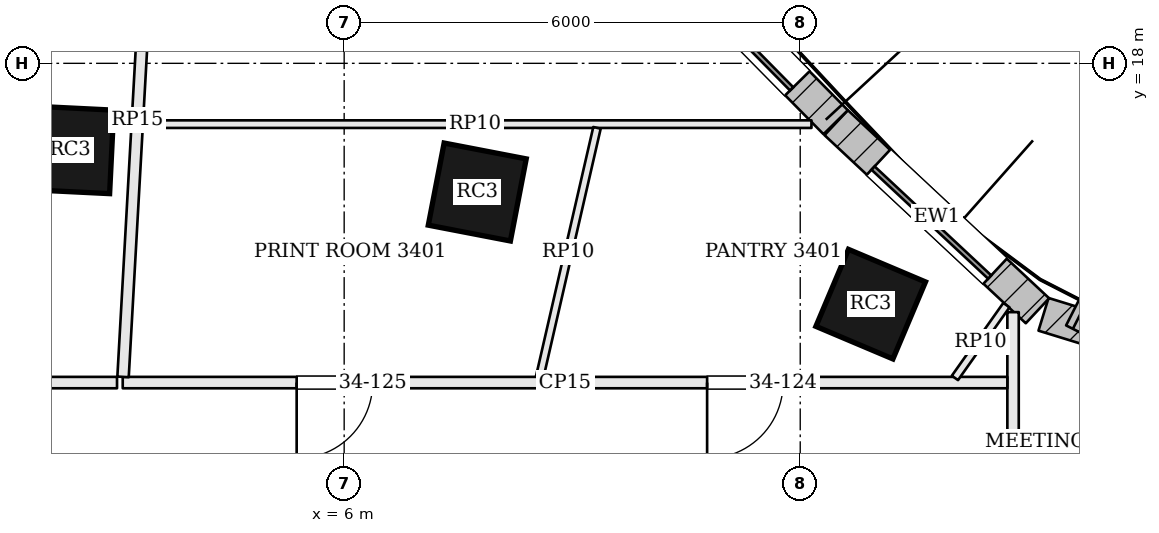
"""IFC4 building model, lengths in metres.
Left out: names, types, materials, properties, quantities, classifications, styles, units other than length and angle.
Written with IfcOpenShell. Run it as: python <this file> out.ifc"""

import sys

from ifc_helpers import new_model, si_unit, direction, frame, frame_2d, origin, origin_2d, place, context, subcontext, project, spatial, rectangle, extrude, element, fill, save


model = new_model("IFC4")
c1 = context("Model", 3, precision=1e-05, world=origin(), true_north=direction((0.0, 1.0)))
c2 = subcontext(c1, "Body", "Model", "MODEL_VIEW")
j1 = project(units=[si_unit("LENGTHUNIT", "METRE"), si_unit("PLANEANGLEUNIT", "RADIAN")], contexts=[c1])
p1 = place(None, origin())
s1 = spatial("IfcSite", under=j1, at=p1, CompositionType="ELEMENT")
p2 = place(p1, origin())
s2 = spatial("IfcBuilding", under=s1, at=p2, CompositionType="ELEMENT")
p3 = place(p2, frame((0.0, 0.0, 142.2)))
s3 = spatial("IfcBuildingStorey", under=s2, at=p3, CompositionType="ELEMENT", Elevation=142.2)
for number, where, z_axis, x_axis in (
    (1, (12.927, 14.832, 0.0), (0.0, 0.0, 1.0), (-0.921, 0.389, 0.0)),
    (2, (7.751, 16.307, 0.0), (0.0, 0.0, 1.0), (-0.982, 0.189, 0.0)),
    (3, (2.392, 16.862, 0.0), (0.0, 0.0, 1.0), (-0.999, 0.049, 0.0)),
):
    element("IfcColumn", number, at=place(p3, frame(where, z_axis=z_axis, x_axis=x_axis)), inside=s3, PredefinedType="COLUMN", context=c2, shape_type="SweptSolid", body=[
        extrude(rectangle(XDim=1.1, YDim=1.1, at=origin_2d()), origin(), (0.0, 0.0, 1.0), 3.9),
    ])
p4 = place(p3, frame((18.958, 13.542, 0.0), z_axis=(0.0, 0.0, 1.0), x_axis=(-0.955792437529, 0.294042201668, 0.0)))
e4 = element("IfcWall", 4, at=p4, inside=s3, PredefinedType="SOLIDWALL", context=c2, shape_type="SweptSolid", body=[
    extrude(rectangle(XDim=3.931, YDim=0.45, at=frame_2d((1.965, 0.0))), origin(), (0.0, 0.0, 1.0), 3.7),
])
p5 = place(p4, frame((0.915, 0.0, 0.9)))
e5 = element("IfcOpeningElement", 5, at=p5, cuts=e4, PredefinedType="OPENING", context=c2, shape_type="SweptSolid", body=[
    extrude(rectangle(XDim=2.1, YDim=2.3, at=frame_2d((1.05, 1.15))), frame((0.0, 0.235, 0.0), z_axis=(0.0, -1.0, 0.0), x_axis=(1.0, 0.0, 0.0)), (0.0, 0.0, 1.0), 0.47),
])
p6 = place(p3, frame((15.121, 14.745, 0.0), z_axis=(0.0, 0.0, 1.0), x_axis=(-0.730618259172, 0.68278617397, 0.0)))
e6 = element("IfcWall", 6, at=p6, inside=s3, PredefinedType="SOLIDWALL", context=c2, shape_type="SweptSolid", body=[
    extrude(rectangle(XDim=3.624, YDim=0.45, at=frame_2d((1.812, 0.0))), origin(), (0.0, 0.0, 1.0), 3.7),
])
p7 = place(p6, frame((0.762, 0.0, 0.9)))
e7 = element("IfcOpeningElement", 7, at=p7, cuts=e6, PredefinedType="OPENING", context=c2, shape_type="SweptSolid", body=[
    extrude(rectangle(XDim=2.1, YDim=2.3, at=frame_2d((1.05, 1.15))), frame((0.0, 0.235, 0.0), z_axis=(0.0, -1.0, 0.0), x_axis=(1.0, 0.0, 0.0)), (0.0, 0.0, 1.0), 0.47),
])
p8 = place(p3, frame((12.466, 17.226, 0.0), z_axis=(0.0, 0.0, 1.0), x_axis=(-0.701875966769, 0.712299183821, 0.0)))
e8 = element("IfcWall", 8, at=p8, inside=s3, PredefinedType="SOLIDWALL", context=c2, shape_type="SweptSolid", body=[
    extrude(rectangle(XDim=3.537, YDim=0.45, at=frame_2d((1.769, 0.0))), origin(), (0.0, 0.0, 1.0), 3.7),
])
p9 = place(p8, frame((0.718, 0.0, 0.9)))
e9 = element("IfcOpeningElement", 9, at=p9, cuts=e8, PredefinedType="OPENING", context=c2, shape_type="SweptSolid", body=[
    extrude(rectangle(XDim=2.1, YDim=2.3, at=frame_2d((1.05, 1.15))), frame((0.0, 0.235, 0.0), z_axis=(0.0, -1.0, 0.0), x_axis=(1.0, 0.0, 0.0)), (0.0, 0.0, 1.0), 0.47),
])
p10 = place(p3, frame((15.587, 14.507, 0.0), z_axis=(0.0, 0.0, 1.0), x_axis=(0.452117231361, 0.89195852432, 0.0)))
e10 = element("IfcWall", 10, at=p10, inside=s3, PredefinedType="SOLIDWALL", context=c2, shape_type="SweptSolid", body=[
    extrude(rectangle(XDim=1.75, YDim=0.2, at=frame_2d((0.875, 0.0))), origin(), (0.0, 0.0, 1.0), 3.7),
])
p11 = place(p3, frame((14.8, 3.784, 0.0), z_axis=(0.0, 0.0, 1.0), x_axis=(0.0, 1.0, 0.0)))
e11 = element("IfcWall", 11, at=p11, inside=s3, PredefinedType="PARTITIONING", context=c2, shape_type="SweptSolid", body=[
    extrude(rectangle(XDim=10.943, YDim=0.15, at=frame_2d((5.472, 0.0))), origin(), (0.0, 0.0, 1.0), 3.198),
])
p12 = place(p11, frame((1.387, 0.0, 0.0)))
e12 = element("IfcOpeningElement", 12, at=p12, cuts=e11, PredefinedType="OPENING", context=c2, shape_type="SweptSolid", body=[
    extrude(rectangle(XDim=1.8, YDim=2.1, at=frame_2d((0.9, 1.05))), frame((0.0, 0.085, 0.0), z_axis=(0.0, -1.0, 0.0), x_axis=(1.0, 0.0, 0.0)), (0.0, 0.0, 1.0), 0.17),
])
p13 = place(p11, frame((7.199, 0.0, 0.0)))
e13 = element("IfcOpeningElement", 13, at=p13, cuts=e11, PredefinedType="OPENING", context=c2, shape_type="SweptSolid", body=[
    extrude(rectangle(XDim=1.0, YDim=2.4, at=frame_2d((0.5, 1.2))), frame((0.0, 0.085, 0.0), z_axis=(0.0, -1.0, 0.0), x_axis=(1.0, 0.0, 0.0)), (0.0, 0.0, 1.0), 0.17),
])
p14 = place(p3, frame((14.725, 13.8, 0.0), z_axis=(0.0, 0.0, 1.0), x_axis=(-1.0, 0.0, 0.0)))
e14 = element("IfcWall", 14, at=p14, inside=s3, PredefinedType="PARTITIONING", context=c2, shape_type="SweptSolid", body=[
    extrude(rectangle(XDim=11.638, YDim=0.15, at=frame_2d((5.819, 0.0))), origin(), (0.0, 0.0, 1.0), 3.198),
])
p15 = place(p14, frame((2.95, 0.0, 0.0)))
e15 = element("IfcOpeningElement", 15, at=p15, cuts=e14, PredefinedType="OPENING", context=c2, shape_type="SweptSolid", body=[
    extrude(rectangle(XDim=1.0, YDim=2.1, at=frame_2d((0.5, 1.05))), frame((0.0, 0.085, 0.0), z_axis=(0.0, -1.0, 0.0), x_axis=(1.0, 0.0, 0.0)), (0.0, 0.0, 1.0), 0.17),
])
p16 = place(p14, frame((8.35, 0.0, 0.0)))
e16 = element("IfcOpeningElement", 16, at=p16, cuts=e14, PredefinedType="OPENING", context=c2, shape_type="SweptSolid", body=[
    extrude(rectangle(XDim=1.0, YDim=2.1, at=frame_2d((0.5, 1.05))), frame((0.0, 0.085, 0.0), z_axis=(0.0, -1.0, 0.0), x_axis=(1.0, 0.0, 0.0)), (0.0, 0.0, 1.0), 0.17),
])
p17 = place(p3, frame((3.47, 20.638, 0.0), z_axis=(0.0, 0.0, 1.0), x_axis=(-0.056008975247, -0.998430265312, 0.0)))
e17 = element("IfcWall", 17, at=p17, inside=s3, PredefinedType="PARTITIONING", context=c2, shape_type="SweptSolid", body=[
    extrude(rectangle(XDim=6.774, YDim=0.15, at=frame_2d((3.387, 0.0))), origin(), (0.0, 0.0, 1.0), 3.198),
])
p18 = place(p3, frame((3.012, 13.8, 0.0), z_axis=(0.0, 0.0, 1.0), x_axis=(-1.0, 0.0, 0.0)))
e18 = element("IfcWall", 18, at=p18, inside=s3, PredefinedType="PARTITIONING", context=c2, shape_type="SweptSolid", body=[
    extrude(rectangle(XDim=17.812, YDim=0.15, at=frame_2d((8.906, 0.0))), origin(), (0.0, 0.0, 1.0), 3.198),
])
p19 = place(p18, frame((3.342, 0.0, 0.0)))
e19 = element("IfcOpeningElement", 19, at=p19, cuts=e18, PredefinedType="OPENING", context=c2, shape_type="SweptSolid", body=[
    extrude(rectangle(XDim=1.8, YDim=2.1, at=frame_2d((0.9, 1.05))), frame((0.0, 0.085, 0.0), z_axis=(0.0, -1.0, 0.0), x_axis=(1.0, 0.0, 0.0)), (0.0, 0.0, 1.0), 0.17),
])
p20 = place(p18, frame((9.659, 0.0, 0.0)))
e20 = element("IfcOpeningElement", 20, at=p20, cuts=e18, PredefinedType="OPENING", context=c2, shape_type="SweptSolid", body=[
    extrude(rectangle(XDim=1.0, YDim=2.4, at=frame_2d((0.5, 1.2))), frame((0.0, 0.085, 0.0), z_axis=(0.0, -1.0, 0.0), x_axis=(1.0, 0.0, 0.0)), (0.0, 0.0, 1.0), 0.17),
])
p21 = place(p18, frame((14.25, 0.0, 0.0)))
e21 = element("IfcOpeningElement", 21, at=p21, cuts=e18, PredefinedType="OPENING", context=c2, shape_type="SweptSolid", body=[
    extrude(rectangle(XDim=1.0, YDim=2.1, at=frame_2d((0.5, 1.05))), frame((0.0, 0.085, 0.0), z_axis=(0.0, -1.0, 0.0), x_axis=(1.0, 0.0, 0.0)), (0.0, 0.0, 1.0), 0.17),
])
p22 = place(p3, frame((3.298, 17.2, 0.0), z_axis=(0.0, 0.0, 1.0), x_axis=(1.0, 0.0, 0.0)))
e22 = element("IfcWall", 22, at=p22, inside=s3, PredefinedType="PARTITIONING", context=c2, shape_type="SweptSolid", body=[
    extrude(rectangle(XDim=8.85, YDim=0.1, at=frame_2d((4.425, 0.0))), origin(), (0.0, 0.0, 1.0), 3.184),
])
p23 = place(p3, frame((14.035, 13.861, 0.0), z_axis=(0.0, 0.0, 1.0), x_axis=(0.57745118401, 0.816425214019, 0.0)))
e23 = element("IfcWall", 23, at=p23, inside=s3, PredefinedType="PARTITIONING", context=c2, shape_type="SweptSolid", body=[
    extrude(rectangle(XDim=1.173, YDim=0.1, at=frame_2d((0.586, 0.0))), origin(), (0.0, 0.0, 1.0), 3.184),
])
p24 = place(p3, frame((8.573, 13.873, 0.0), z_axis=(0.0, 0.0, 1.0), x_axis=(0.224048430302, 0.974578011695, 0.0)))
e24 = element("IfcWall", 24, at=p24, inside=s3, PredefinedType="PARTITIONING", context=c2, shape_type="SweptSolid", body=[
    extrude(rectangle(XDim=3.364, YDim=0.1, at=frame_2d((1.682, 0.0))), origin(), (0.0, 0.0, 1.0), 3.184),
])
p25 = place(p7, origin())
e25 = element("IfcWindow", 25, at=p25, inside=s3, PartitioningType="SINGLE_PANEL", PredefinedType="WINDOW", context=c2, shape_type="SweptSolid", body=[
    extrude(rectangle(XDim=2.1, YDim=2.3, at=frame_2d((1.05, 1.15))), frame((0.0, 0.135, 0.0), z_axis=(0.0, -1.0, 0.0), x_axis=(1.0, 0.0, 0.0)), (0.0, 0.0, 1.0), 0.06),
])
fill(e7, e25)
p26 = place(p9, origin())
e26 = element("IfcWindow", 26, at=p26, inside=s3, PartitioningType="SINGLE_PANEL", PredefinedType="WINDOW", context=c2, shape_type="SweptSolid", body=[
    extrude(rectangle(XDim=2.1, YDim=2.3, at=frame_2d((1.05, 1.15))), frame((0.0, 0.135, 0.0), z_axis=(0.0, -1.0, 0.0), x_axis=(1.0, 0.0, 0.0)), (0.0, 0.0, 1.0), 0.06),
])
fill(e9, e26)
p27 = place(p15, origin())
e27 = element("IfcDoor", 27, at=p27, inside=s3, OperationType="SINGLE_SWING_RIGHT", PredefinedType="DOOR", context=c2, shape_type="SweptSolid", body=[
    extrude(rectangle(XDim=1.0, YDim=2.1, at=frame_2d((0.5, 1.05))), frame((0.0, 0.025, 0.0), z_axis=(0.0, -1.0, 0.0), x_axis=(1.0, 0.0, 0.0)), (0.0, 0.0, 1.0), 0.05),
])
fill(e15, e27)
p28 = place(p16, origin())
e28 = element("IfcDoor", 28, at=p28, inside=s3, OperationType="SINGLE_SWING_RIGHT", PredefinedType="DOOR", context=c2, shape_type="SweptSolid", body=[
    extrude(rectangle(XDim=1.0, YDim=2.1, at=frame_2d((0.5, 1.05))), frame((0.0, 0.025, 0.0), z_axis=(0.0, -1.0, 0.0), x_axis=(1.0, 0.0, 0.0)), (0.0, 0.0, 1.0), 0.05),
])
fill(e16, e28)
save(model, sys.argv[1])
